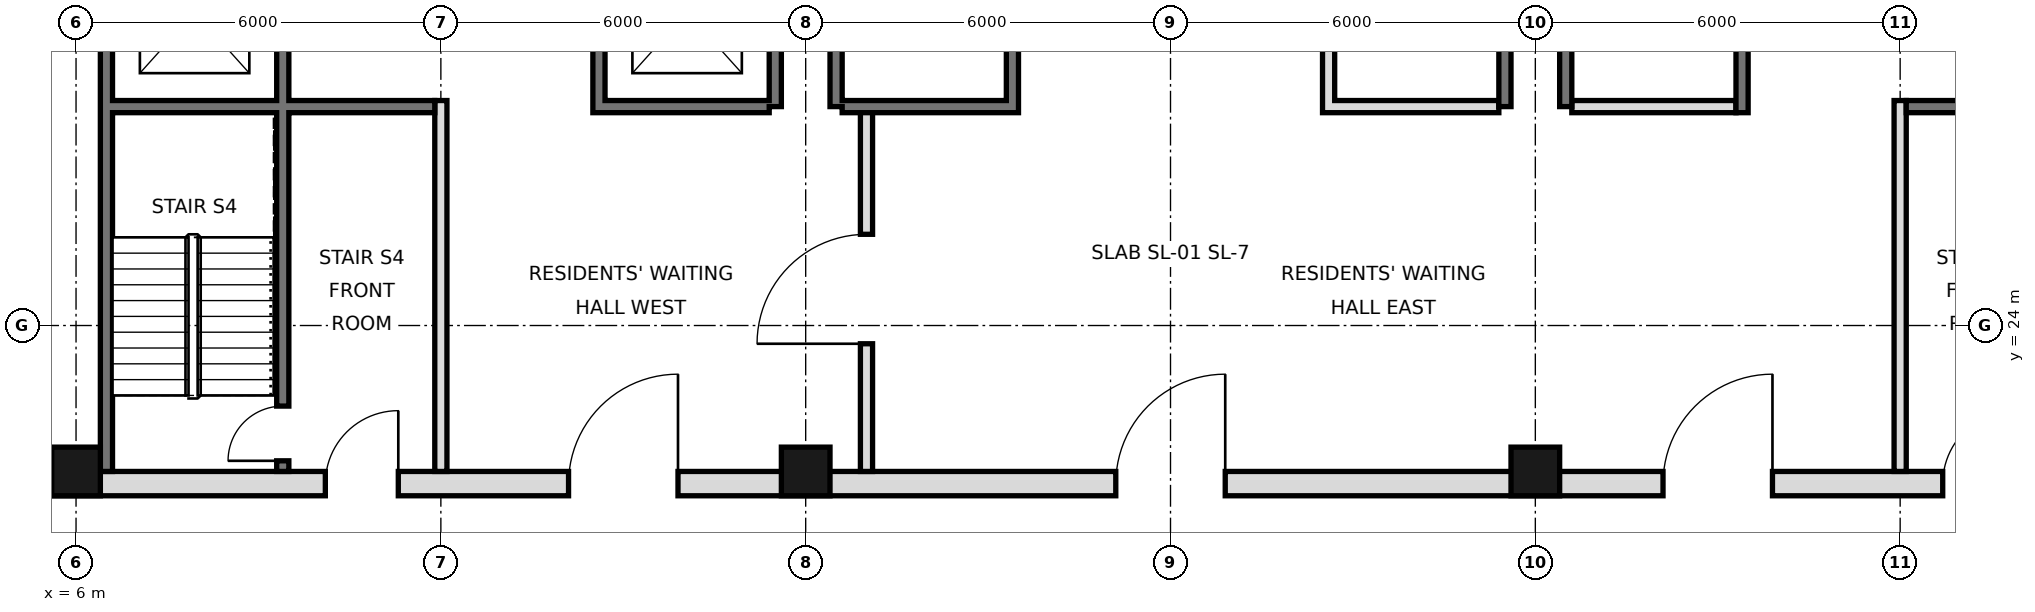
"""IFC4 building model, lengths in metres.
Left out: names, types, materials, properties, quantities, classifications, styles, units other than length and angle.
Written with IfcOpenShell. Run it as: python <this file> out.ifc"""

import sys

from ifc_helpers import new_model, si_unit, direction, frame, frame_2d, origin, origin_2d, place, context, subcontext, project, spatial, rectangle, hollow_rectangle, extrude, element, fill, save


model = new_model("IFC4")
c1 = context("Model", 3, precision=1e-05, world=origin(), true_north=direction((0.0, 1.0)))
c2 = subcontext(c1, "Body", "Model", "MODEL_VIEW")
j1 = project(units=[si_unit("LENGTHUNIT", "METRE"), si_unit("PLANEANGLEUNIT", "RADIAN")], contexts=[c1])
p1 = place(None, origin())
s1 = spatial("IfcSite", under=j1, at=p1, CompositionType="ELEMENT")
p2 = place(p1, origin())
s2 = spatial("IfcBuilding", under=s1, at=p2, CompositionType="ELEMENT")
p3 = place(p2, frame((0.0, 0.0, 64.2)))
s3 = spatial("IfcBuildingStorey", under=s2, at=p3, CompositionType="ELEMENT", Elevation=64.2)
for number, where, z_axis, x_axis in (
    (1, (6.0, 21.6, 0.0), (0.0, 0.0, 1.0), (1.0, 0.0, 0.0)),
    (2, (18.0, 21.6, 0.0), (0.0, 0.0, 1.0), (1.0, 0.0, 0.0)),
    (3, (30.0, 21.6, 0.0), (0.0, 0.0, 1.0), (1.0, 0.0, 0.0)),
):
    element("IfcColumn", number, at=place(p3, frame(where, z_axis=z_axis, x_axis=x_axis)), inside=s3, PredefinedType="COLUMN", context=c2, shape_type="SweptSolid", body=[
        extrude(hollow_rectangle(XDim=0.8, YDim=0.8, WallThickness=0.06, at=origin_2d()), origin(), (0.0, 0.0, 1.0), 3.6),
    ])
p4 = place(p3, frame((6.5, 21.6, 0.0), z_axis=(0.0, 0.0, 1.0), x_axis=(0.0, 1.0, 0.0)))
e4 = element("IfcWall", 4, at=p4, inside=s3, PredefinedType="SOLIDWALL", context=c2, shape_type="SweptSolid", body=[
    extrude(rectangle(XDim=23.5, YDim=0.2, at=frame_2d((11.75, 0.0))), origin(), (0.0, 0.0, 1.0), 3.42),
])
for number, where, z_axis, x_axis in (
    (5, (17.5, 27.6, 0.0), (0.0, 0.0, 1.0), (0.0, 1.0, 0.0)),
    (6, (18.5, 27.6, 0.0), (0.0, 0.0, 1.0), (0.0, 1.0, 0.0)),
    (7, (29.5, 27.6, 0.0), (0.0, 0.0, 1.0), (0.0, 1.0, 0.0)),
    (8, (30.5, 27.6, 0.0), (0.0, 0.0, 1.0), (0.0, 1.0, 0.0)),
):
    element("IfcWall", number, at=place(p3, frame(where, z_axis=z_axis, x_axis=x_axis)), inside=s3, PredefinedType="SOLIDWALL", context=c2, shape_type="SweptSolid", body=[
        extrude(rectangle(XDim=17.5, YDim=0.2, at=frame_2d((8.75, 0.0))), origin(), (0.0, 0.0, 1.0), 3.42),
    ])
p5 = place(p3, frame((5.6, 21.4, 0.0), z_axis=(0.0, 0.0, 1.0), x_axis=(1.0, 0.0, 0.0)))
e9 = element("IfcWall", 9, at=p5, inside=s3, PredefinedType="SOLIDWALL", context=c2, shape_type="SweptSolid", body=[
    extrude(rectangle(XDim=36.8, YDim=0.4, at=frame_2d((18.4, 0.0))), origin(), (0.0, 0.0, 1.0), 3.42),
])
p6 = place(p5, frame((8.5, 0.0, 0.0)))
e10 = element("IfcOpeningElement", 10, at=p6, cuts=e9, PredefinedType="OPENING", context=c2, shape_type="SweptSolid", body=[
    extrude(rectangle(XDim=1.8, YDim=2.1, at=frame_2d((0.9, 1.05))), frame((0.0, 0.21, 0.0), z_axis=(0.0, -1.0, 0.0), x_axis=(1.0, 0.0, 0.0)), (0.0, 0.0, 1.0), 0.42),
])
p7 = place(p5, frame((17.5, 0.0, 0.0)))
e11 = element("IfcOpeningElement", 11, at=p7, cuts=e9, PredefinedType="OPENING", context=c2, shape_type="SweptSolid", body=[
    extrude(rectangle(XDim=1.8, YDim=2.1, at=frame_2d((0.9, 1.05))), frame((0.0, 0.21, 0.0), z_axis=(0.0, -1.0, 0.0), x_axis=(1.0, 0.0, 0.0)), (0.0, 0.0, 1.0), 0.42),
])
p8 = place(p5, frame((26.5, 0.0, 0.0)))
e12 = element("IfcOpeningElement", 12, at=p8, cuts=e9, PredefinedType="OPENING", context=c2, shape_type="SweptSolid", body=[
    extrude(rectangle(XDim=1.8, YDim=2.1, at=frame_2d((0.9, 1.05))), frame((0.0, 0.21, 0.0), z_axis=(0.0, -1.0, 0.0), x_axis=(1.0, 0.0, 0.0)), (0.0, 0.0, 1.0), 0.42),
])
p9 = place(p5, frame((4.5, 0.0, 0.0)))
e13 = element("IfcOpeningElement", 13, at=p9, cuts=e9, PredefinedType="OPENING", context=c2, shape_type="SweptSolid", body=[
    extrude(rectangle(XDim=1.2, YDim=2.1, at=frame_2d((0.6, 1.05))), frame((0.0, 0.21, 0.0), z_axis=(0.0, -1.0, 0.0), x_axis=(1.0, 0.0, 0.0)), (0.0, 0.0, 1.0), 0.42),
])
p10 = place(p5, frame((31.1, 0.0, 0.0)))
e14 = element("IfcOpeningElement", 14, at=p10, cuts=e9, PredefinedType="OPENING", context=c2, shape_type="SweptSolid", body=[
    extrude(rectangle(XDim=1.2, YDim=2.1, at=frame_2d((0.6, 1.05))), frame((0.0, 0.21, 0.0), z_axis=(0.0, -1.0, 0.0), x_axis=(1.0, 0.0, 0.0)), (0.0, 0.0, 1.0), 0.42),
])
p11 = place(p3, frame((19.0, 21.6, 0.0), z_axis=(0.0, 0.0, 1.0), x_axis=(0.0, 1.0, 0.0)))
e15 = element("IfcWall", 15, at=p11, inside=s3, PredefinedType="PARTITIONING", context=c2, shape_type="SweptSolid", body=[
    extrude(rectangle(XDim=6.0, YDim=0.2, at=frame_2d((3.0, 0.0))), origin(), (0.0, 0.0, 1.0), 3.42),
])
p12 = place(p11, frame((2.1, 0.0, 0.0)))
e16 = element("IfcOpeningElement", 16, at=p12, cuts=e15, PredefinedType="OPENING", context=c2, shape_type="SweptSolid", body=[
    extrude(rectangle(XDim=1.8, YDim=2.1, at=frame_2d((0.9, 1.05))), frame((0.0, 0.11, 0.0), z_axis=(0.0, -1.0, 0.0), x_axis=(1.0, 0.0, 0.0)), (0.0, 0.0, 1.0), 0.22),
])
p13 = place(p3, frame((12.0, 21.6, 0.0), z_axis=(0.0, 0.0, 1.0), x_axis=(0.0, 1.0, 0.0)))
e17 = element("IfcWall", 17, at=p13, inside=s3, PredefinedType="PARTITIONING", context=c2, shape_type="SweptSolid", body=[
    extrude(rectangle(XDim=6.1, YDim=0.2, at=frame_2d((3.05, 0.0))), origin(), (0.0, 0.0, 1.0), 3.42),
])
p14 = place(p3, frame((14.6, 27.5, 0.0), z_axis=(0.0, 0.0, 1.0), x_axis=(0.0, 1.0, 0.0)))
e18 = element("IfcWall", 18, at=p14, inside=s3, PredefinedType="SOLIDWALL", context=c2, shape_type="SweptSolid", body=[
    extrude(rectangle(XDim=17.5, YDim=0.2, at=frame_2d((8.75, 0.0))), origin(), (0.0, 0.0, 1.0), 3.42),
])
p15 = place(p14, frame((1.1, 0.0, 0.0)))
e19 = element("IfcOpeningElement", 19, at=p15, cuts=e18, PredefinedType="OPENING", context=c2, shape_type="SweptSolid", body=[
    extrude(rectangle(XDim=1.1, YDim=2.1, at=frame_2d((0.55, 1.05))), frame((0.0, 0.11, 0.0), z_axis=(0.0, -1.0, 0.0), x_axis=(1.0, 0.0, 0.0)), (0.0, 0.0, 1.0), 0.22),
])
p16 = place(p14, frame((4.2, 0.0, 0.0)))
e20 = element("IfcOpeningElement", 20, at=p16, cuts=e18, PredefinedType="OPENING", context=c2, shape_type="SweptSolid", body=[
    extrude(rectangle(XDim=1.1, YDim=2.1, at=frame_2d((0.55, 1.05))), frame((0.0, 0.11, 0.0), z_axis=(0.0, -1.0, 0.0), x_axis=(1.0, 0.0, 0.0)), (0.0, 0.0, 1.0), 0.22),
])
p17 = place(p14, frame((15.4, 0.0, 0.0)))
e21 = element("IfcOpeningElement", 21, at=p17, cuts=e18, PredefinedType="OPENING", context=c2, shape_type="SweptSolid", body=[
    extrude(rectangle(XDim=1.1, YDim=2.1, at=frame_2d((0.55, 1.05))), frame((0.0, 0.11, 0.0), z_axis=(0.0, -1.0, 0.0), x_axis=(1.0, 0.0, 0.0)), (0.0, 0.0, 1.0), 0.22),
])
p18 = place(p14, frame((9.9, 0.0, 0.0)))
e22 = element("IfcOpeningElement", 22, at=p18, cuts=e18, PredefinedType="OPENING", context=c2, shape_type="SweptSolid", body=[
    extrude(rectangle(XDim=0.9, YDim=2.1, at=frame_2d((0.45, 1.05))), frame((0.0, 0.11, 0.0), z_axis=(0.0, -1.0, 0.0), x_axis=(1.0, 0.0, 0.0)), (0.0, 0.0, 1.0), 0.22),
])
p19 = place(p3, frame((21.4, 27.5, 0.0), z_axis=(0.0, 0.0, 1.0), x_axis=(0.0, 1.0, 0.0)))
e23 = element("IfcWall", 23, at=p19, inside=s3, PredefinedType="SOLIDWALL", context=c2, shape_type="SweptSolid", body=[
    extrude(rectangle(XDim=17.5, YDim=0.2, at=frame_2d((8.75, 0.0))), origin(), (0.0, 0.0, 1.0), 3.42),
])
p20 = place(p19, frame((9.8, 0.0, 0.0)))
e24 = element("IfcOpeningElement", 24, at=p20, cuts=e23, PredefinedType="OPENING", context=c2, shape_type="SweptSolid", body=[
    extrude(rectangle(XDim=1.0, YDim=2.1, at=frame_2d((0.5, 1.05))), frame((0.0, 0.11, 0.0), z_axis=(0.0, -1.0, 0.0), x_axis=(1.0, 0.0, 0.0)), (0.0, 0.0, 1.0), 0.22),
])
p21 = place(p19, frame((7.4, 0.0, 0.0)))
e25 = element("IfcOpeningElement", 25, at=p21, cuts=e23, PredefinedType="OPENING", context=c2, shape_type="SweptSolid", body=[
    extrude(rectangle(XDim=0.9, YDim=2.1, at=frame_2d((0.45, 1.05))), frame((0.0, 0.11, 0.0), z_axis=(0.0, -1.0, 0.0), x_axis=(1.0, 0.0, 0.0)), (0.0, 0.0, 1.0), 0.22),
])
p22 = place(p3, frame((26.6, 27.5, 0.0), z_axis=(0.0, 0.0, 1.0), x_axis=(0.0, 1.0, 0.0)))
e26 = element("IfcWall", 26, at=p22, inside=s3, PredefinedType="SOLIDWALL", context=c2, shape_type="SweptSolid", body=[
    extrude(rectangle(XDim=17.5, YDim=0.2, at=frame_2d((8.75, 0.0))), origin(), (0.0, 0.0, 1.0), 3.42),
])
p23 = place(p22, frame((4.3, 0.0, 0.0)))
e27 = element("IfcOpeningElement", 27, at=p23, cuts=e26, PredefinedType="OPENING", context=c2, shape_type="SweptSolid", body=[
    extrude(rectangle(XDim=0.9, YDim=2.1, at=frame_2d((0.45, 1.05))), frame((0.0, 0.11, 0.0), z_axis=(0.0, -1.0, 0.0), x_axis=(1.0, 0.0, 0.0)), (0.0, 0.0, 1.0), 0.22),
])
p24 = place(p22, frame((10.35, 0.0, 0.0)))
e28 = element("IfcOpeningElement", 28, at=p24, cuts=e26, PredefinedType="OPENING", context=c2, shape_type="SweptSolid", body=[
    extrude(rectangle(XDim=1.0, YDim=2.1, at=frame_2d((0.5, 1.05))), frame((0.0, 0.11, 0.0), z_axis=(0.0, -1.0, 0.0), x_axis=(1.0, 0.0, 0.0)), (0.0, 0.0, 1.0), 0.22),
])
p25 = place(p3, frame((33.4, 27.5, 0.0), z_axis=(0.0, 0.0, 1.0), x_axis=(0.0, 1.0, 0.0)))
e29 = element("IfcWall", 29, at=p25, inside=s3, PredefinedType="SOLIDWALL", context=c2, shape_type="SweptSolid", body=[
    extrude(rectangle(XDim=17.5, YDim=0.2, at=frame_2d((8.75, 0.0))), origin(), (0.0, 0.0, 1.0), 3.42),
])
p26 = place(p25, frame((15.4, 0.0, 0.0)))
e30 = element("IfcOpeningElement", 30, at=p26, cuts=e29, PredefinedType="OPENING", context=c2, shape_type="SweptSolid", body=[
    extrude(rectangle(XDim=1.1, YDim=2.1, at=frame_2d((0.55, 1.05))), frame((0.0, 0.11, 0.0), z_axis=(0.0, -1.0, 0.0), x_axis=(1.0, 0.0, 0.0)), (0.0, 0.0, 1.0), 0.22),
])
p27 = place(p25, frame((2.7, 0.0, 0.0)))
e31 = element("IfcOpeningElement", 31, at=p27, cuts=e29, PredefinedType="OPENING", context=c2, shape_type="SweptSolid", body=[
    extrude(rectangle(XDim=1.0, YDim=2.1, at=frame_2d((0.5, 1.05))), frame((0.0, 0.11, 0.0), z_axis=(0.0, -1.0, 0.0), x_axis=(1.0, 0.0, 0.0)), (0.0, 0.0, 1.0), 0.22),
])
p28 = place(p25, frame((9.9, 0.0, 0.0)))
e32 = element("IfcOpeningElement", 32, at=p28, cuts=e29, PredefinedType="OPENING", context=c2, shape_type="SweptSolid", body=[
    extrude(rectangle(XDim=0.9, YDim=2.1, at=frame_2d((0.45, 1.05))), frame((0.0, 0.11, 0.0), z_axis=(0.0, -1.0, 0.0), x_axis=(1.0, 0.0, 0.0)), (0.0, 0.0, 1.0), 0.22),
])
p29 = place(p3, frame((36.0, 21.6, 0.0), z_axis=(0.0, 0.0, 1.0), x_axis=(0.0, 1.0, 0.0)))
e33 = element("IfcWall", 33, at=p29, inside=s3, PredefinedType="PARTITIONING", context=c2, shape_type="SweptSolid", body=[
    extrude(rectangle(XDim=6.1, YDim=0.2, at=frame_2d((3.05, 0.0))), origin(), (0.0, 0.0, 1.0), 3.42),
])
p30 = place(p3, frame((9.4, 21.6, 0.0), z_axis=(0.0, 0.0, 1.0), x_axis=(0.0, 1.0, 0.0)))
e34 = element("IfcWall", 34, at=p30, inside=s3, PredefinedType="SOLIDWALL", context=c2, shape_type="SweptSolid", body=[
    extrude(rectangle(XDim=23.4, YDim=0.2, at=frame_2d((11.7, 0.0))), origin(), (0.0, 0.0, 1.0), 3.42),
])
p31 = place(p30, frame((7.0, 0.0, 0.0)))
e35 = element("IfcOpeningElement", 35, at=p31, cuts=e34, PredefinedType="OPENING", context=c2, shape_type="SweptSolid", body=[
    extrude(rectangle(XDim=1.1, YDim=2.1, at=frame_2d((0.55, 1.05))), frame((0.0, 0.11, 0.0), z_axis=(0.0, -1.0, 0.0), x_axis=(1.0, 0.0, 0.0)), (0.0, 0.0, 1.0), 0.22),
])
p32 = place(p30, frame((10.1, 0.0, 0.0)))
e36 = element("IfcOpeningElement", 36, at=p32, cuts=e34, PredefinedType="OPENING", context=c2, shape_type="SweptSolid", body=[
    extrude(rectangle(XDim=1.1, YDim=2.1, at=frame_2d((0.55, 1.05))), frame((0.0, 0.11, 0.0), z_axis=(0.0, -1.0, 0.0), x_axis=(1.0, 0.0, 0.0)), (0.0, 0.0, 1.0), 0.22),
])
p33 = place(p30, frame((13.2, 0.0, 0.0)))
e37 = element("IfcOpeningElement", 37, at=p33, cuts=e34, PredefinedType="OPENING", context=c2, shape_type="SweptSolid", body=[
    extrude(rectangle(XDim=1.1, YDim=2.1, at=frame_2d((0.55, 1.05))), frame((0.0, 0.11, 0.0), z_axis=(0.0, -1.0, 0.0), x_axis=(1.0, 0.0, 0.0)), (0.0, 0.0, 1.0), 0.22),
])
p34 = place(p30, frame((15.7, 0.0, 0.0)))
e38 = element("IfcOpeningElement", 38, at=p34, cuts=e34, PredefinedType="OPENING", context=c2, shape_type="SweptSolid", body=[
    extrude(rectangle(XDim=1.0, YDim=2.1, at=frame_2d((0.5, 1.05))), frame((0.0, 0.11, 0.0), z_axis=(0.0, -1.0, 0.0), x_axis=(1.0, 0.0, 0.0)), (0.0, 0.0, 1.0), 0.22),
])
p35 = place(p30, frame((0.175, 0.0, 0.0)))
e39 = element("IfcOpeningElement", 39, at=p35, cuts=e34, PredefinedType="OPENING", context=c2, shape_type="SweptSolid", body=[
    extrude(rectangle(XDim=0.9, YDim=2.1, at=frame_2d((0.45, 1.05))), frame((0.0, 0.11, 0.0), z_axis=(0.0, -1.0, 0.0), x_axis=(1.0, 0.0, 0.0)), (0.0, 0.0, 1.0), 0.22),
])
for number, where, z_axis, x_axis in (
    (40, (14.7, 27.6, 0.0), (0.0, 0.0, 1.0), (1.0, 0.0, 0.0)),
    (41, (18.6, 27.6, 0.0), (0.0, 0.0, 1.0), (1.0, 0.0, 0.0)),
    (42, (26.7, 27.6, 0.0), (0.0, 0.0, 1.0), (1.0, 0.0, 0.0)),
):
    element("IfcWall", number, at=place(p3, frame(where, z_axis=z_axis, x_axis=x_axis)), inside=s3, PredefinedType="SOLIDWALL", context=c2, shape_type="SweptSolid", body=[
        extrude(rectangle(XDim=2.7, YDim=0.2, at=frame_2d((1.35, 0.0))), origin(), (0.0, 0.0, 1.0), 3.42),
    ])
p36 = place(p3, frame((30.6, 27.6, 0.0), z_axis=(0.0, 0.0, 1.0), x_axis=(1.0, 0.0, 0.0)))
e43 = element("IfcWall", 43, at=p36, inside=s3, PredefinedType="PARTITIONING", context=c2, shape_type="SweptSolid", body=[
    extrude(rectangle(XDim=2.7, YDim=0.2, at=frame_2d((1.35, 0.0))), origin(), (0.0, 0.0, 1.0), 3.42),
])
for number, where, z_axis, x_axis in (
    (44, (36.1, 27.6, 0.0), (0.0, 0.0, 1.0), (1.0, 0.0, 0.0)),
    (45, (6.6, 27.6, 0.0), (0.0, 0.0, 1.0), (1.0, 0.0, 0.0)),
):
    element("IfcWall", number, at=place(p3, frame(where, z_axis=z_axis, x_axis=x_axis)), inside=s3, PredefinedType="SOLIDWALL", context=c2, shape_type="SweptSolid", body=[
        extrude(rectangle(XDim=5.3, YDim=0.2, at=frame_2d((2.65, 0.0))), origin(), (0.0, 0.0, 1.0), 3.42),
    ])
p37 = place(p6, frame((1.8, 0.0, 0.0), z_axis=(0.0, 0.0, 1.0), x_axis=(-1.0, 0.0, 0.0)))
e46 = element("IfcDoor", 46, at=p37, inside=s3, OperationType="SINGLE_SWING_LEFT", PredefinedType="DOOR", context=c2, shape_type="SweptSolid", body=[
    extrude(rectangle(XDim=1.8, YDim=2.1, at=frame_2d((0.9, 1.05))), frame((0.0, 0.025, 0.0), z_axis=(0.0, -1.0, 0.0), x_axis=(1.0, 0.0, 0.0)), (0.0, 0.0, 1.0), 0.05),
])
fill(e10, e46)
p38 = place(p12, origin())
e47 = element("IfcDoor", 47, at=p38, inside=s3, OperationType="SINGLE_SWING_LEFT", PredefinedType="DOOR", context=c2, shape_type="SweptSolid", body=[
    extrude(rectangle(XDim=1.8, YDim=2.1, at=frame_2d((0.9, 1.05))), frame((0.0, 0.025, 0.0), z_axis=(0.0, -1.0, 0.0), x_axis=(1.0, 0.0, 0.0)), (0.0, 0.0, 1.0), 0.05),
])
fill(e16, e47)
p39 = place(p7, frame((1.8, 0.0, 0.0), z_axis=(0.0, 0.0, 1.0), x_axis=(-1.0, 0.0, 0.0)))
e48 = element("IfcDoor", 48, at=p39, inside=s3, OperationType="SINGLE_SWING_LEFT", PredefinedType="DOOR", context=c2, shape_type="SweptSolid", body=[
    extrude(rectangle(XDim=1.8, YDim=2.1, at=frame_2d((0.9, 1.05))), frame((0.0, 0.025, 0.0), z_axis=(0.0, -1.0, 0.0), x_axis=(1.0, 0.0, 0.0)), (0.0, 0.0, 1.0), 0.05),
])
fill(e11, e48)
p40 = place(p8, frame((1.8, 0.0, 0.0), z_axis=(0.0, 0.0, 1.0), x_axis=(-1.0, 0.0, 0.0)))
e49 = element("IfcDoor", 49, at=p40, inside=s3, OperationType="SINGLE_SWING_LEFT", PredefinedType="DOOR", context=c2, shape_type="SweptSolid", body=[
    extrude(rectangle(XDim=1.8, YDim=2.1, at=frame_2d((0.9, 1.05))), frame((0.0, 0.025, 0.0), z_axis=(0.0, -1.0, 0.0), x_axis=(1.0, 0.0, 0.0)), (0.0, 0.0, 1.0), 0.05),
])
fill(e12, e49)
p41 = place(p9, frame((1.2, 0.0, 0.0), z_axis=(0.0, 0.0, 1.0), x_axis=(-1.0, 0.0, 0.0)))
e50 = element("IfcDoor", 50, at=p41, inside=s3, OperationType="SINGLE_SWING_LEFT", PredefinedType="DOOR", context=c2, shape_type="SweptSolid", body=[
    extrude(rectangle(XDim=1.2, YDim=2.1, at=frame_2d((0.6, 1.05))), frame((0.0, 0.025, 0.0), z_axis=(0.0, -1.0, 0.0), x_axis=(1.0, 0.0, 0.0)), (0.0, 0.0, 1.0), 0.05),
])
fill(e13, e50)
p42 = place(p10, frame((1.2, 0.0, 0.0), z_axis=(0.0, 0.0, 1.0), x_axis=(-1.0, 0.0, 0.0)))
e51 = element("IfcDoor", 51, at=p42, inside=s3, OperationType="SINGLE_SWING_LEFT", PredefinedType="DOOR", context=c2, shape_type="SweptSolid", body=[
    extrude(rectangle(XDim=1.2, YDim=2.1, at=frame_2d((0.6, 1.05))), frame((0.0, 0.025, 0.0), z_axis=(0.0, -1.0, 0.0), x_axis=(1.0, 0.0, 0.0)), (0.0, 0.0, 1.0), 0.05),
])
fill(e14, e51)
p43 = place(p35, origin())
e52 = element("IfcDoor", 52, at=p43, inside=s3, OperationType="SINGLE_SWING_LEFT", PredefinedType="DOOR", context=c2, shape_type="SweptSolid", body=[
    extrude(rectangle(XDim=0.9, YDim=2.1, at=frame_2d((0.45, 1.05))), frame((0.0, 0.025, 0.0), z_axis=(0.0, -1.0, 0.0), x_axis=(1.0, 0.0, 0.0)), (0.0, 0.0, 1.0), 0.05),
])
fill(e39, e52)
save(model, sys.argv[1])
